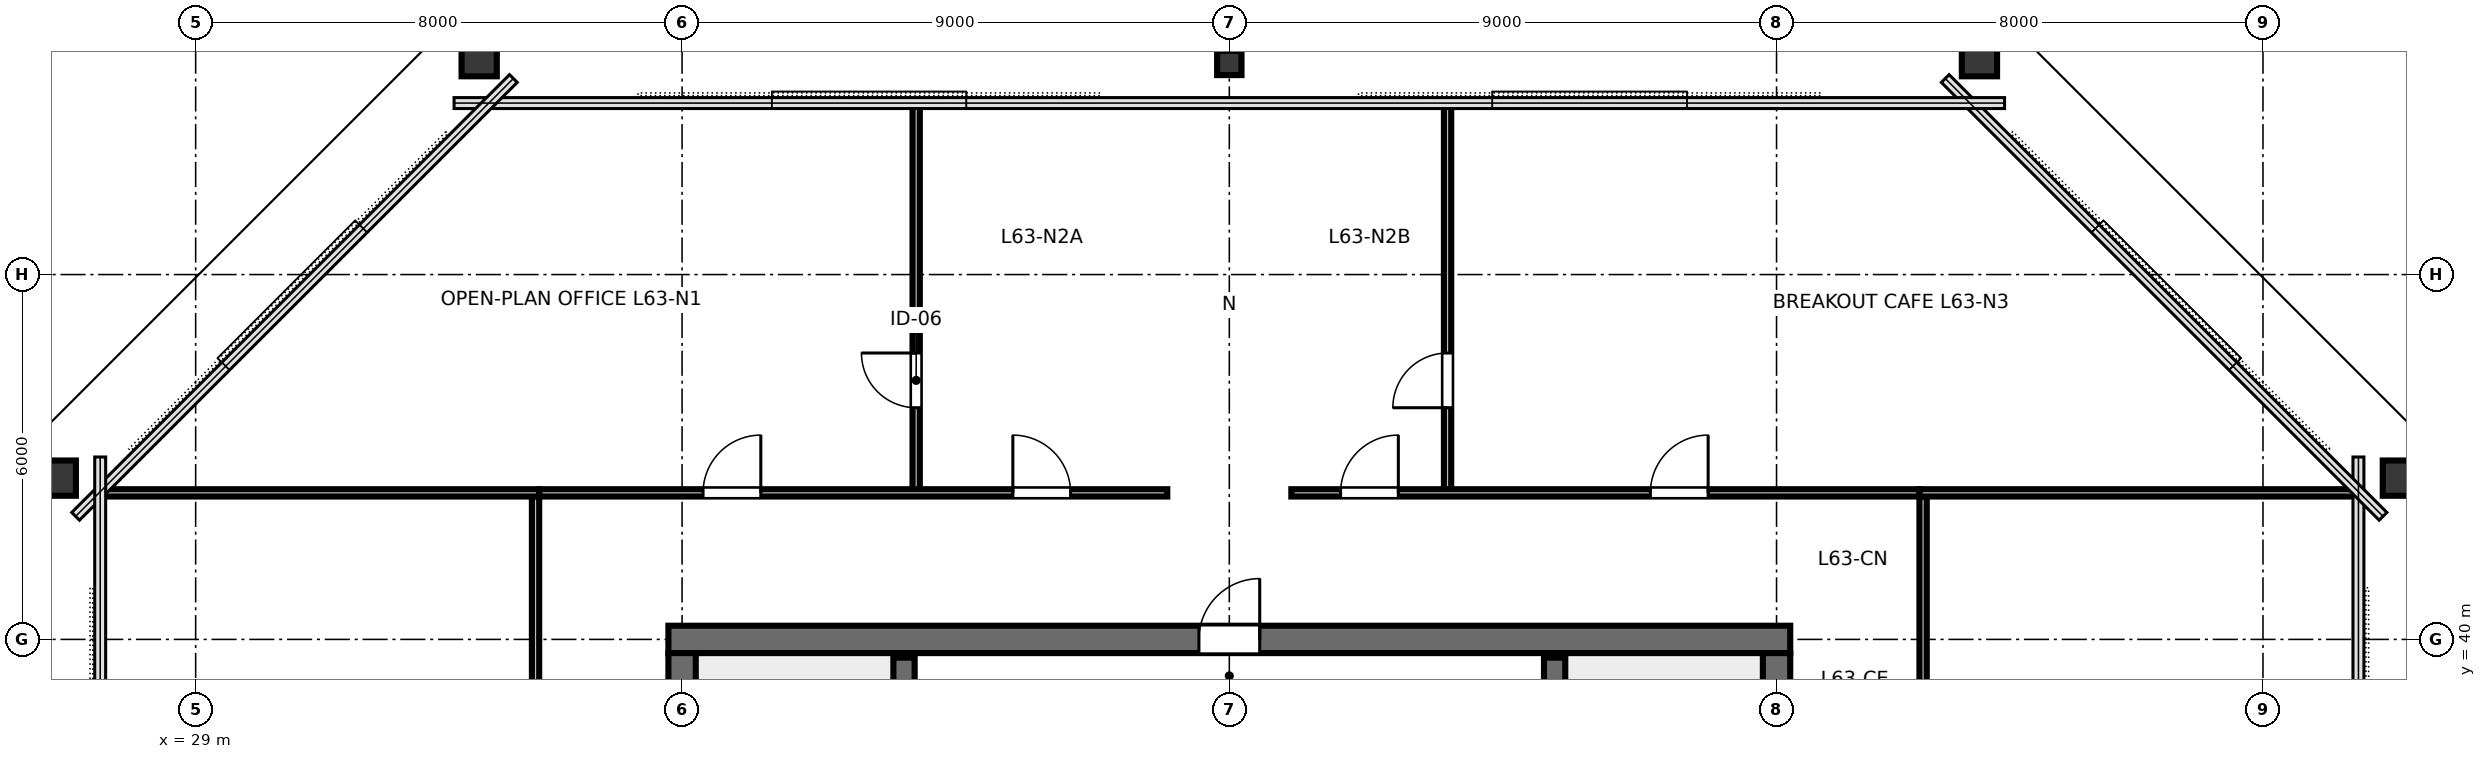
"""IFC4 building model, lengths in metres.
Left out: names, types, materials, properties, quantities, classifications, styles, units other than length and angle.
Written with IfcOpenShell. Run it as: python <this file> out.ifc"""

import sys

from ifc_helpers import new_model, si_unit, direction, frame, frame_2d, origin, origin_2d, place, context, subcontext, project, spatial, rectangle, hollow_rectangle, i_section, extrude, element, fill, save


model = new_model("IFC4")
c1 = context("Model", 3, precision=1e-05, world=origin(), true_north=direction((0.0, 1.0)))
c2 = subcontext(c1, "Body", "Model", "MODEL_VIEW")
j1 = project(units=[si_unit("LENGTHUNIT", "METRE"), si_unit("PLANEANGLEUNIT", "RADIAN")], contexts=[c1])
p1 = place(None, origin())
s1 = spatial("IfcSite", under=j1, at=p1, CompositionType="ELEMENT")
p2 = place(p1, origin())
s2 = spatial("IfcBuilding", under=s1, at=p2, CompositionType="ELEMENT")
p3 = place(p2, frame((0.0, 0.0, 239.4)))
s3 = spatial("IfcBuildingStorey", under=s2, at=p3, CompositionType="ELEMENT", Elevation=239.4)
p4 = place(p3, frame((36.775, 40.0, 0.0), z_axis=(0.0, 0.0, 1.0), x_axis=(1.0, 0.0, 0.0)))
e1 = element("IfcWall", 1, at=p4, inside=s3, PredefinedType="SHEAR", context=c2, shape_type="SweptSolid", body=[
    extrude(rectangle(XDim=18.45, YDim=0.45, at=frame_2d((9.225, 0.0))), origin(), (0.0, 0.0, 1.0), 3.36),
])
p5 = place(p4, frame((8.725, 0.0, 0.0)))
e2 = element("IfcOpeningElement", 2, at=p5, cuts=e1, PredefinedType="OPENING", context=c2, shape_type="SweptSolid", body=[
    extrude(rectangle(XDim=1.0, YDim=2.15, at=frame_2d((0.5, 1.075))), frame((0.0, 0.235, 0.0), z_axis=(0.0, -1.0, 0.0), x_axis=(1.0, 0.0, 0.0)), (0.0, 0.0, 1.0), 0.47),
])
p6 = place(p3, frame((37.0, 24.225, 0.0), z_axis=(0.0, 0.0, 1.0), x_axis=(0.0, 1.0, 0.0)))
e3 = element("IfcWall", 3, at=p6, inside=s3, PredefinedType="SHEAR", context=c2, shape_type="SweptSolid", body=[
    extrude(rectangle(XDim=15.55, YDim=0.45, at=frame_2d((7.775, 0.0))), origin(), (0.0, 0.0, 1.0), 3.36),
])
p7 = place(p6, frame((5.3, 0.0, 0.0)))
e4 = element("IfcOpeningElement", 4, at=p7, cuts=e3, PredefinedType="OPENING", context=c2, shape_type="SweptSolid", body=[
    extrude(rectangle(XDim=1.15, YDim=2.15, at=frame_2d((0.575, 1.075))), frame((0.0, 0.235, 0.0), z_axis=(0.0, -1.0, 0.0), x_axis=(1.0, 0.0, 0.0)), (0.0, 0.0, 1.0), 0.47),
])
p8 = place(p3, frame((55.0, 24.225, 0.0), z_axis=(0.0, 0.0, 1.0), x_axis=(0.0, 1.0, 0.0)))
e5 = element("IfcWall", 5, at=p8, inside=s3, PredefinedType="SHEAR", context=c2, shape_type="SweptSolid", body=[
    extrude(rectangle(XDim=15.55, YDim=0.45, at=frame_2d((7.775, 0.0))), origin(), (0.0, 0.0, 1.0), 3.36),
])
p9 = place(p8, frame((5.3, 0.0, 0.0)))
e6 = element("IfcOpeningElement", 6, at=p9, cuts=e5, PredefinedType="OPENING", context=c2, shape_type="SweptSolid", body=[
    extrude(rectangle(XDim=1.15, YDim=2.15, at=frame_2d((0.575, 1.075))), frame((0.0, 0.235, 0.0), z_axis=(0.0, -1.0, 0.0), x_axis=(1.0, 0.0, 0.0)), (0.0, 0.0, 1.0), 0.47),
])
for number, where, z_axis, x_axis in (
    (7, (65.32, 42.652, 0.0), (0.0, 0.0, 1.0), (0.0, 1.0, 0.0)),
    (8, (58.337, 49.61, 0.0), (0.0, 0.0, 1.0), (1.0, 0.0, 0.0)),
):
    element("IfcColumn", number, at=place(p3, frame(where, z_axis=z_axis, x_axis=x_axis)), inside=s3, PredefinedType="COLUMN", context=c2, shape_type="SweptSolid", body=[
        extrude(hollow_rectangle(XDim=0.58, YDim=0.7, WallThickness=0.032, at=origin_2d()), origin(), (0.0, 0.0, 1.0), 3.373),
    ])
p10 = place(p3, frame((46.0, 49.48, 0.0), z_axis=(0.0, 0.0, 1.0), x_axis=(1.0, 0.0, 0.0)))
e9 = element("IfcColumn", 9, at=p10, inside=s3, PredefinedType="COLUMN", context=c2, shape_type="SweptSolid", body=[
    extrude(i_section(OverallWidth=0.401, OverallDepth=0.399, WebThickness=0.025, FlangeThickness=0.04, FilletRadius=0.025, at=origin_2d()), origin(), (0.0, 0.0, 1.0), 3.373),
])
for number, where, z_axis, x_axis in (
    (10, (33.663, 49.61, 0.0), (0.0, 0.0, 1.0), (1.0, 0.0, 0.0)),
    (11, (26.68, 42.652, 0.0), (0.0, 0.0, 1.0), (0.0, 1.0, 0.0)),
):
    element("IfcColumn", number, at=place(p3, frame(where, z_axis=z_axis, x_axis=x_axis)), inside=s3, PredefinedType="COLUMN", context=c2, shape_type="SweptSolid", body=[
        extrude(hollow_rectangle(XDim=0.58, YDim=0.7, WallThickness=0.032, at=origin_2d()), origin(), (0.0, 0.0, 1.0), 3.373),
    ])
for number, where, z_axis, x_axis in (
    (12, (40.65, 32.0, 0.0), (0.0, 0.0, 1.0), (0.0, 1.0, 0.0)),
    (13, (51.35, 32.0, 0.0), (0.0, 0.0, 1.0), (0.0, 1.0, 0.0)),
):
    element("IfcWall", number, at=place(p3, frame(where, z_axis=z_axis, x_axis=x_axis)), inside=s3, PredefinedType="SHEAR", context=c2, shape_type="SweptSolid", body=[
        extrude(rectangle(XDim=7.7, YDim=0.35, at=frame_2d((3.85, 0.0))), origin(), (0.0, 0.0, 1.0), 3.6),
    ])
p11 = place(p3, frame((40.85, 42.41, 0.0), z_axis=(0.0, 0.0, 1.0), x_axis=(0.0, 1.0, 0.0)))
e14 = element("IfcWall", 14, at=p11, inside=s3, PredefinedType="PARTITIONING", context=c2, shape_type="SweptSolid", body=[
    extrude(rectangle(XDim=6.41, YDim=0.12, at=frame_2d((3.205, 0.0))), origin(), (0.0, 0.0, 1.0), 2.655),
])
p12 = place(p11, frame((1.4, 0.0, 0.0)))
e15 = element("IfcOpeningElement", 15, at=p12, cuts=e14, PredefinedType="OPENING", context=c2, shape_type="SweptSolid", body=[
    extrude(rectangle(XDim=0.9, YDim=2.15, at=frame_2d((0.45, 1.075))), frame((0.0, 0.07, 0.0), z_axis=(0.0, -1.0, 0.0), x_axis=(1.0, 0.0, 0.0)), (0.0, 0.0, 1.0), 0.14),
])
p13 = place(p3, frame((49.59, 42.41, 0.0), z_axis=(0.0, 0.0, 1.0), x_axis=(0.0, 1.0, 0.0)))
e16 = element("IfcWall", 16, at=p13, inside=s3, PredefinedType="PARTITIONING", context=c2, shape_type="SweptSolid", body=[
    extrude(rectangle(XDim=6.41, YDim=0.12, at=frame_2d((3.205, 0.0))), origin(), (0.0, 0.0, 1.0), 2.655),
])
p14 = place(p13, frame((1.4, 0.0, 0.0)))
e17 = element("IfcOpeningElement", 17, at=p14, cuts=e16, PredefinedType="OPENING", context=c2, shape_type="SweptSolid", body=[
    extrude(rectangle(XDim=0.9, YDim=2.15, at=frame_2d((0.45, 1.075))), frame((0.0, 0.07, 0.0), z_axis=(0.0, -1.0, 0.0), x_axis=(1.0, 0.0, 0.0)), (0.0, 0.0, 1.0), 0.14),
])
p15 = place(p3, frame((34.65, 42.41, 0.0), z_axis=(0.0, 0.0, 1.0), x_axis=(1.0, 0.0, 0.0)))
e18 = element("IfcWall", 18, at=p15, inside=s3, PredefinedType="PARTITIONING", context=c2, shape_type="SweptSolid", body=[
    extrude(rectangle(XDim=10.33, YDim=0.12, at=frame_2d((5.165, 0.0))), origin(), (0.0, 0.0, 1.0), 2.655),
])
p16 = place(p15, frame((2.695, 0.0, 0.0)))
e19 = element("IfcOpeningElement", 19, at=p16, cuts=e18, PredefinedType="OPENING", context=c2, shape_type="SweptSolid", body=[
    extrude(rectangle(XDim=0.95, YDim=2.15, at=frame_2d((0.475, 1.075))), frame((0.0, 0.07, 0.0), z_axis=(0.0, -1.0, 0.0), x_axis=(1.0, 0.0, 0.0)), (0.0, 0.0, 1.0), 0.14),
])
p17 = place(p15, frame((7.79, 0.0, 0.0)))
e20 = element("IfcOpeningElement", 20, at=p17, cuts=e18, PredefinedType="OPENING", context=c2, shape_type="SweptSolid", body=[
    extrude(rectangle(XDim=0.95, YDim=2.15, at=frame_2d((0.475, 1.075))), frame((0.0, 0.07, 0.0), z_axis=(0.0, -1.0, 0.0), x_axis=(1.0, 0.0, 0.0)), (0.0, 0.0, 1.0), 0.14),
])
p18 = place(p3, frame((47.02, 42.41, 0.0), z_axis=(0.0, 0.0, 1.0), x_axis=(1.0, 0.0, 0.0)))
e21 = element("IfcWall", 21, at=p18, inside=s3, PredefinedType="PARTITIONING", context=c2, shape_type="SweptSolid", body=[
    extrude(rectangle(XDim=10.33, YDim=0.12, at=frame_2d((5.165, 0.0))), origin(), (0.0, 0.0, 1.0), 2.655),
])
p19 = place(p18, frame((0.81, 0.0, 0.0)))
e22 = element("IfcOpeningElement", 22, at=p19, cuts=e21, PredefinedType="OPENING", context=c2, shape_type="SweptSolid", body=[
    extrude(rectangle(XDim=0.95, YDim=2.15, at=frame_2d((0.475, 1.075))), frame((0.0, 0.07, 0.0), z_axis=(0.0, -1.0, 0.0), x_axis=(1.0, 0.0, 0.0)), (0.0, 0.0, 1.0), 0.14),
])
p20 = place(p18, frame((5.905, 0.0, 0.0)))
e23 = element("IfcOpeningElement", 23, at=p20, cuts=e21, PredefinedType="OPENING", context=c2, shape_type="SweptSolid", body=[
    extrude(rectangle(XDim=0.95, YDim=2.15, at=frame_2d((0.475, 1.075))), frame((0.0, 0.07, 0.0), z_axis=(0.0, -1.0, 0.0), x_axis=(1.0, 0.0, 0.0)), (0.0, 0.0, 1.0), 0.14),
])
p21 = place(p3, frame((34.59, 21.65, 0.0), z_axis=(0.0, 0.0, 1.0), x_axis=(0.0, 1.0, 0.0)))
e24 = element("IfcWall", 24, at=p21, inside=s3, PredefinedType="PARTITIONING", context=c2, shape_type="SweptSolid", body=[
    extrude(rectangle(XDim=20.7, YDim=0.12, at=frame_2d((10.35, 0.0))), origin(), (0.0, 0.0, 1.0), 2.655),
])
p22 = place(p21, frame((4.26, 0.0, 0.0)))
e25 = element("IfcOpeningElement", 25, at=p22, cuts=e24, PredefinedType="OPENING", context=c2, shape_type="SweptSolid", body=[
    extrude(rectangle(XDim=0.95, YDim=2.15, at=frame_2d((0.475, 1.075))), frame((0.0, 0.07, 0.0), z_axis=(0.0, -1.0, 0.0), x_axis=(1.0, 0.0, 0.0)), (0.0, 0.0, 1.0), 0.14),
])
p23 = place(p21, frame((14.411, 0.0, 0.0)))
e26 = element("IfcOpeningElement", 26, at=p23, cuts=e24, PredefinedType="OPENING", context=c2, shape_type="SweptSolid", body=[
    extrude(rectangle(XDim=0.95, YDim=2.15, at=frame_2d((0.475, 1.075))), frame((0.0, 0.07, 0.0), z_axis=(0.0, -1.0, 0.0), x_axis=(1.0, 0.0, 0.0)), (0.0, 0.0, 1.0), 0.14),
])
p24 = place(p3, frame((57.41, 21.65, 0.0), z_axis=(0.0, 0.0, 1.0), x_axis=(0.0, 1.0, 0.0)))
e27 = element("IfcWall", 27, at=p24, inside=s3, PredefinedType="PARTITIONING", context=c2, shape_type="SweptSolid", body=[
    extrude(rectangle(XDim=20.7, YDim=0.12, at=frame_2d((10.35, 0.0))), origin(), (0.0, 0.0, 1.0), 2.655),
])
p25 = place(p24, frame((9.875, 0.0, 0.0)))
e28 = element("IfcOpeningElement", 28, at=p25, cuts=e27, PredefinedType="OPENING", context=c2, shape_type="SweptSolid", body=[
    extrude(rectangle(XDim=0.95, YDim=2.15, at=frame_2d((0.475, 1.075))), frame((0.0, 0.07, 0.0), z_axis=(0.0, -1.0, 0.0), x_axis=(1.0, 0.0, 0.0)), (0.0, 0.0, 1.0), 0.14),
])
for number, where, z_axis, x_axis in (
    (29, (34.65, 42.41, 0.0), (0.0, 0.0, 1.0), (-1.0, 0.0, 0.0)),
    (30, (57.35, 42.41, 0.0), (0.0, 0.0, 1.0), (1.0, 0.0, 0.0)),
):
    element("IfcWall", number, at=place(p3, frame(where, z_axis=z_axis, x_axis=x_axis)), inside=s3, PredefinedType="PARTITIONING", context=c2, shape_type="SweptSolid", body=[
        extrude(rectangle(XDim=7.22, YDim=0.12, at=frame_2d((3.61, 0.0))), origin(), (0.0, 0.0, 1.0), 2.655),
    ])
p26 = place(p5, origin())
e31 = element("IfcDoor", 31, at=p26, inside=s3, OperationType="SINGLE_SWING_RIGHT", PredefinedType="DOOR", context=c2, shape_type="SweptSolid", body=[
    extrude(rectangle(XDim=1.0, YDim=2.15, at=frame_2d((0.5, 1.075))), frame((0.0, 0.025, 0.0), z_axis=(0.0, -1.0, 0.0), x_axis=(1.0, 0.0, 0.0)), (0.0, 0.0, 1.0), 0.05),
])
fill(e2, e31)
p27 = place(p12, origin())
e32 = element("IfcDoor", 32, at=p27, inside=s3, OperationType="SINGLE_SWING_RIGHT", PredefinedType="DOOR", context=c2, shape_type="SweptSolid", body=[
    extrude(rectangle(XDim=0.9, YDim=2.15, at=frame_2d((0.45, 1.075))), frame((0.0, 0.025, 0.0), z_axis=(0.0, -1.0, 0.0), x_axis=(1.0, 0.0, 0.0)), (0.0, 0.0, 1.0), 0.05),
])
fill(e15, e32)
p28 = place(p14, origin())
e33 = element("IfcDoor", 33, at=p28, inside=s3, OperationType="SINGLE_SWING_LEFT", PredefinedType="DOOR", context=c2, shape_type="SweptSolid", body=[
    extrude(rectangle(XDim=0.9, YDim=2.15, at=frame_2d((0.45, 1.075))), frame((0.0, 0.025, 0.0), z_axis=(0.0, -1.0, 0.0), x_axis=(1.0, 0.0, 0.0)), (0.0, 0.0, 1.0), 0.05),
])
fill(e17, e33)
p29 = place(p16, origin())
e34 = element("IfcDoor", 34, at=p29, inside=s3, OperationType="SINGLE_SWING_RIGHT", PredefinedType="DOOR", context=c2, shape_type="SweptSolid", body=[
    extrude(rectangle(XDim=0.95, YDim=2.15, at=frame_2d((0.475, 1.075))), frame((0.0, 0.025, 0.0), z_axis=(0.0, -1.0, 0.0), x_axis=(1.0, 0.0, 0.0)), (0.0, 0.0, 1.0), 0.05),
])
fill(e19, e34)
p30 = place(p17, origin())
e35 = element("IfcDoor", 35, at=p30, inside=s3, OperationType="SINGLE_SWING_LEFT", PredefinedType="DOOR", context=c2, shape_type="SweptSolid", body=[
    extrude(rectangle(XDim=0.95, YDim=2.15, at=frame_2d((0.475, 1.075))), frame((0.0, 0.025, 0.0), z_axis=(0.0, -1.0, 0.0), x_axis=(1.0, 0.0, 0.0)), (0.0, 0.0, 1.0), 0.05),
])
fill(e20, e35)
p31 = place(p19, origin())
e36 = element("IfcDoor", 36, at=p31, inside=s3, OperationType="SINGLE_SWING_RIGHT", PredefinedType="DOOR", context=c2, shape_type="SweptSolid", body=[
    extrude(rectangle(XDim=0.95, YDim=2.15, at=frame_2d((0.475, 1.075))), frame((0.0, 0.025, 0.0), z_axis=(0.0, -1.0, 0.0), x_axis=(1.0, 0.0, 0.0)), (0.0, 0.0, 1.0), 0.05),
])
fill(e22, e36)
p32 = place(p20, origin())
e37 = element("IfcDoor", 37, at=p32, inside=s3, OperationType="SINGLE_SWING_RIGHT", PredefinedType="DOOR", context=c2, shape_type="SweptSolid", body=[
    extrude(rectangle(XDim=0.95, YDim=2.15, at=frame_2d((0.475, 1.075))), frame((0.0, 0.025, 0.0), z_axis=(0.0, -1.0, 0.0), x_axis=(1.0, 0.0, 0.0)), (0.0, 0.0, 1.0), 0.05),
])
fill(e23, e37)
save(model, sys.argv[1])
